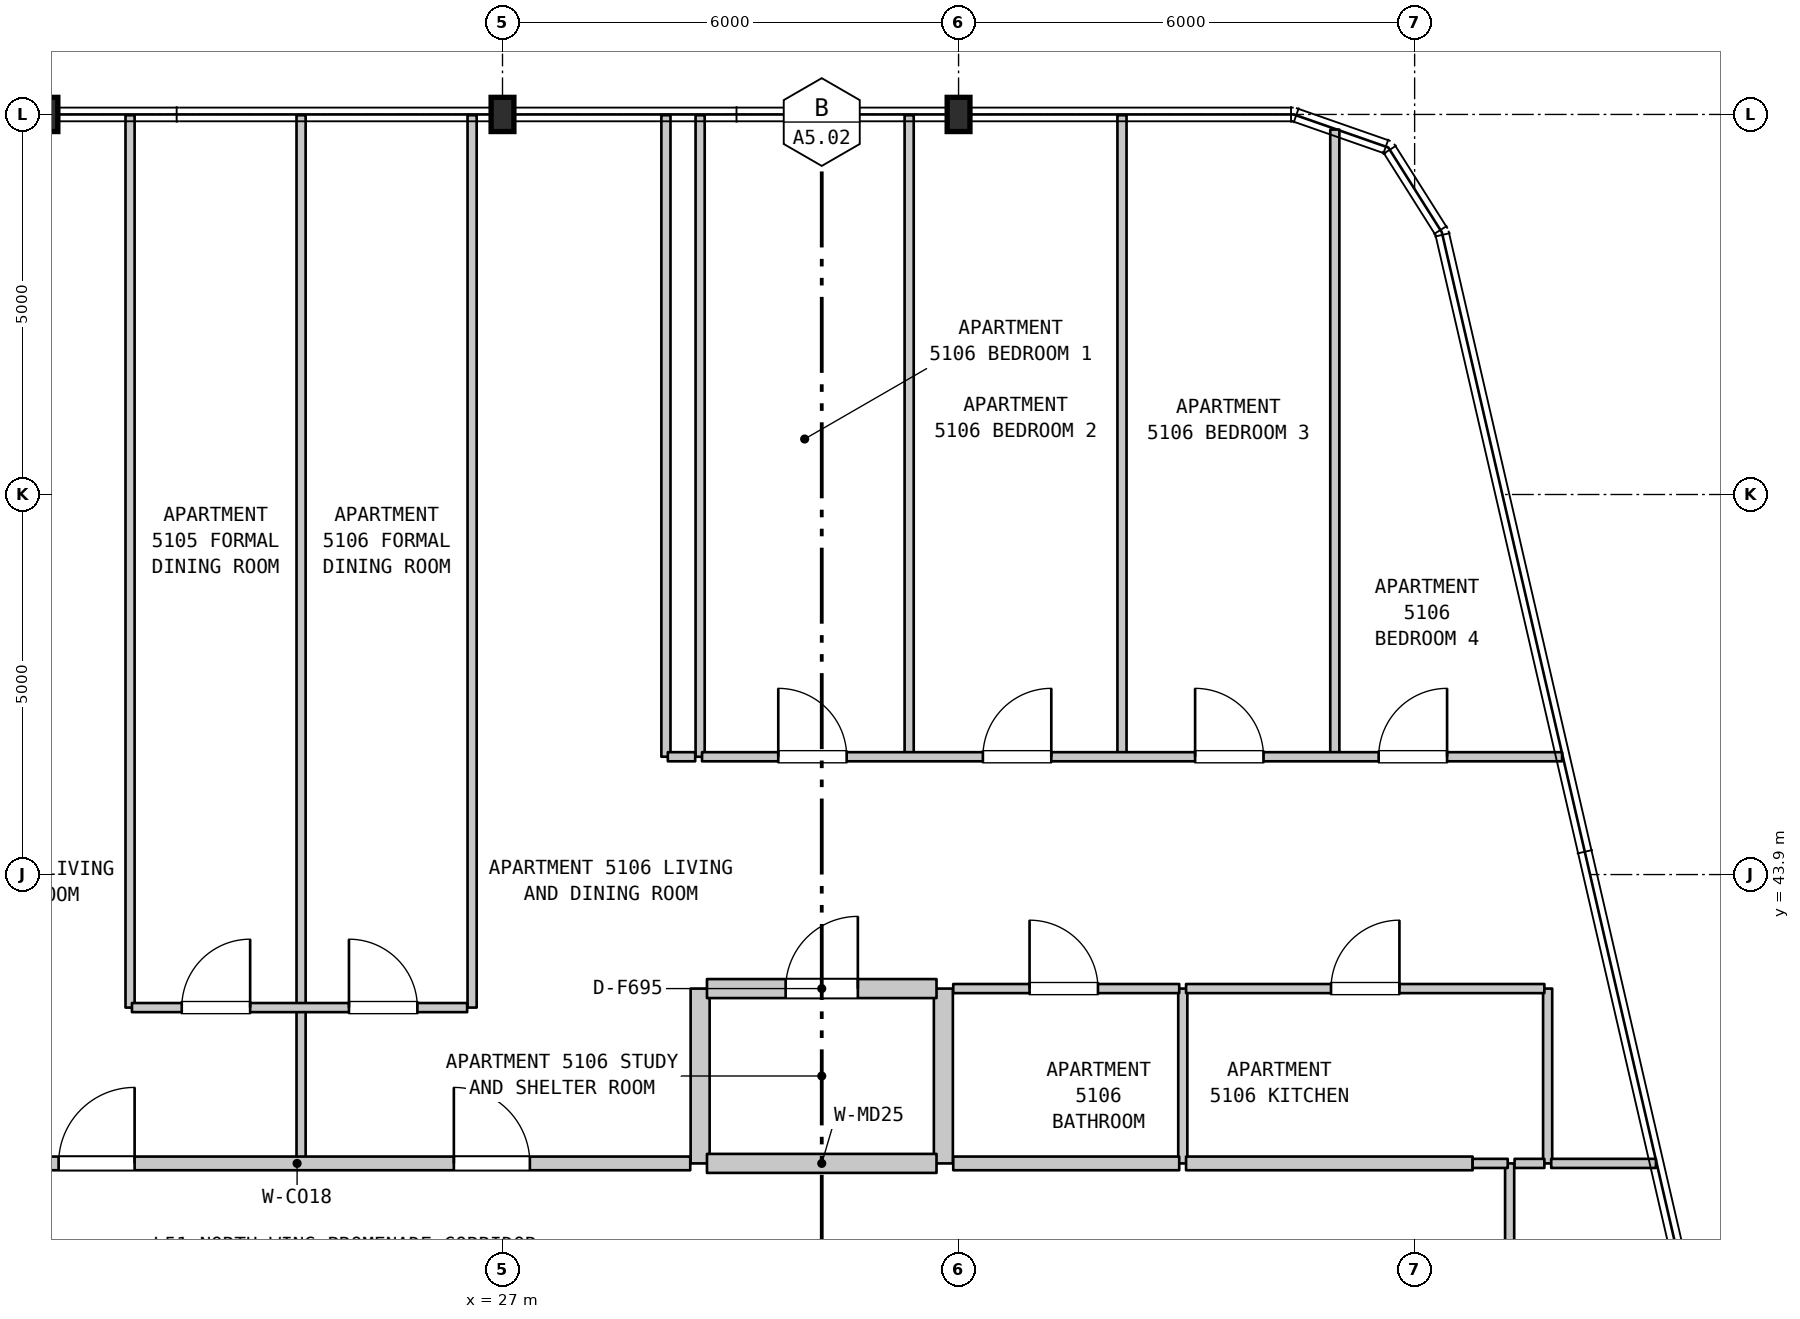
"""IFC4 building model, lengths in metres.
Left out: names, types, materials, properties, quantities, classifications, styles, units other than length and angle.
Written with IfcOpenShell. Run it as: python <this file> out.ifc"""

import sys

from ifc_helpers import new_model, si_unit, direction, frame, frame_2d, origin, origin_2d, place, context, subcontext, project, spatial, rectangle, i_section, extrude, element, fill, save


model = new_model("IFC4")
c1 = context("Model", 3, precision=1e-05, world=origin(), true_north=direction((0.0, 1.0)))
c2 = subcontext(c1, "Body", "Model", "MODEL_VIEW")
j1 = project(units=[si_unit("LENGTHUNIT", "METRE"), si_unit("PLANEANGLEUNIT", "RADIAN")], contexts=[c1])
p1 = place(None, origin())
s1 = spatial("IfcSite", under=j1, at=p1, CompositionType="ELEMENT")
p2 = place(p1, origin())
s2 = spatial("IfcBuilding", under=s1, at=p2, CompositionType="ELEMENT")
p3 = place(p2, frame((0.0, 0.0, 206.9)))
s3 = spatial("IfcBuildingStorey", under=s2, at=p3, CompositionType="ELEMENT", Elevation=206.9)
for number, where, z_axis, x_axis in (
    (1, (21.0, 53.9, 0.0), (0.0, 0.0, 1.0), (1.0, 0.0, 0.0)),
    (2, (27.0, 53.9, 0.0), (0.0, 0.0, 1.0), (1.0, 0.0, 0.0)),
    (3, (33.0, 53.9, 0.0), (0.0, 0.0, 1.0), (1.0, 0.0, 0.0)),
):
    element("IfcColumn", number, at=place(p3, frame(where, z_axis=z_axis, x_axis=x_axis)), inside=s3, PredefinedType="COLUMN", context=c2, shape_type="SweptSolid", body=[
        extrude(i_section(OverallWidth=0.3, OverallDepth=0.45, WebThickness=0.014, FlangeThickness=0.026, FilletRadius=0.027, at=origin_2d()), origin(), (0.0, 0.0, 1.0), 3.7),
    ])
p4 = place(p3, frame((22.1, 42.15, 0.0), z_axis=(0.0, 0.0, 1.0), x_axis=(0.0, 1.0, 0.0)))
e4 = element("IfcWall", 4, at=p4, inside=s3, PredefinedType="PARTITIONING", context=c2, shape_type="SweptSolid", body=[
    extrude(rectangle(XDim=11.74, YDim=0.12, at=frame_2d((5.87, 0.0))), origin(), (0.0, 0.0, 1.0), 3.39),
])
p5 = place(p3, frame((24.35, 40.1, 0.0), z_axis=(0.0, 0.0, 1.0), x_axis=(0.0, 1.0, 0.0)))
e5 = element("IfcWall", 5, at=p5, inside=s3, PredefinedType="PARTITIONING", context=c2, shape_type="SweptSolid", body=[
    extrude(rectangle(XDim=2.05, YDim=0.12, at=frame_2d((1.025, 0.0))), origin(), (0.0, 0.0, 1.0), 3.39),
])
for number, where, z_axis, x_axis in (
    (6, (24.35, 42.15, 0.0), (0.0, 0.0, 1.0), (0.0, 1.0, 0.0)),
    (7, (26.6, 42.15, 0.0), (0.0, 0.0, 1.0), (0.0, 1.0, 0.0)),
):
    element("IfcWall", number, at=place(p3, frame(where, z_axis=z_axis, x_axis=x_axis)), inside=s3, PredefinedType="PARTITIONING", context=c2, shape_type="SweptSolid", body=[
        extrude(rectangle(XDim=11.74, YDim=0.12, at=frame_2d((5.87, 0.0))), origin(), (0.0, 0.0, 1.0), 3.39),
    ])
p6 = place(p3, frame((29.15, 45.45, 0.0), z_axis=(0.0, 0.0, 1.0), x_axis=(0.0, 1.0, 0.0)))
e8 = element("IfcWall", 8, at=p6, inside=s3, PredefinedType="PARTITIONING", context=c2, shape_type="SweptSolid", body=[
    extrude(rectangle(XDim=8.44, YDim=0.12, at=frame_2d((4.22, 0.0))), origin(), (0.0, 0.0, 1.0), 3.39),
])
p7 = place(p3, frame((29.6, 40.1, 0.0), z_axis=(0.0, 0.0, 1.0), x_axis=(0.0, 1.0, 0.0)))
e9 = element("IfcWall", 9, at=p7, inside=s3, PredefinedType="STANDARD", context=c2, shape_type="SweptSolid", body=[
    extrude(rectangle(XDim=2.3, YDim=0.25, at=frame_2d((1.15, 0.0))), origin(), (0.0, 0.0, 1.0), 3.39),
])
for number, where, z_axis, x_axis in (
    (10, (29.6, 45.45, 0.0), (0.0, 0.0, 1.0), (0.0, 1.0, 0.0)),
    (11, (32.35, 45.45, 0.0), (0.0, 0.0, 1.0), (0.0, 1.0, 0.0)),
):
    element("IfcWall", number, at=place(p3, frame(where, z_axis=z_axis, x_axis=x_axis)), inside=s3, PredefinedType="PARTITIONING", context=c2, shape_type="SweptSolid", body=[
        extrude(rectangle(XDim=8.44, YDim=0.12, at=frame_2d((4.22, 0.0))), origin(), (0.0, 0.0, 1.0), 3.39),
    ])
p8 = place(p3, frame((32.8, 40.1, 0.0), z_axis=(0.0, 0.0, 1.0), x_axis=(0.0, 1.0, 0.0)))
e12 = element("IfcWall", 12, at=p8, inside=s3, PredefinedType="STANDARD", context=c2, shape_type="SweptSolid", body=[
    extrude(rectangle(XDim=2.3, YDim=0.25, at=frame_2d((1.15, 0.0))), origin(), (0.0, 0.0, 1.0), 3.39),
])
p9 = place(p3, frame((35.15, 45.45, 0.0), z_axis=(0.0, 0.0, 1.0), x_axis=(0.0, 1.0, 0.0)))
e13 = element("IfcWall", 13, at=p9, inside=s3, PredefinedType="PARTITIONING", context=c2, shape_type="SweptSolid", body=[
    extrude(rectangle(XDim=8.44, YDim=0.12, at=frame_2d((4.22, 0.0))), origin(), (0.0, 0.0, 1.0), 3.39),
])
p10 = place(p3, frame((35.95, 40.1, 0.0), z_axis=(0.0, 0.0, 1.0), x_axis=(0.0, 1.0, 0.0)))
e14 = element("IfcWall", 14, at=p10, inside=s3, PredefinedType="PARTITIONING", context=c2, shape_type="SweptSolid", body=[
    extrude(rectangle(XDim=2.3, YDim=0.12, at=frame_2d((1.15, 0.0))), origin(), (0.0, 0.0, 1.0), 3.39),
])
p11 = place(p3, frame((37.95, 45.45, 0.0), z_axis=(0.0, 0.0, 1.0), x_axis=(0.0, 1.0, 0.0)))
e15 = element("IfcWall", 15, at=p11, inside=s3, PredefinedType="PARTITIONING", context=c2, shape_type="SweptSolid", body=[
    extrude(rectangle(XDim=8.251, YDim=0.12, at=frame_2d((4.125, 0.0))), origin(), (0.0, 0.0, 1.0), 3.39),
])
p12 = place(p3, frame((40.25, 37.9, 0.0), z_axis=(0.0, 0.0, 1.0), x_axis=(0.0, 1.0, 0.0)))
e16 = element("IfcWall", 16, at=p12, inside=s3, PredefinedType="PARTITIONING", context=c2, shape_type="SweptSolid", body=[
    extrude(rectangle(XDim=2.2, YDim=0.12, at=frame_2d((1.1, 0.0))), origin(), (0.0, 0.0, 1.0), 3.39),
])
p13 = place(p3, frame((40.75, 40.1, 0.0), z_axis=(0.0, 0.0, 1.0), x_axis=(0.0, 1.0, 0.0)))
e17 = element("IfcWall", 17, at=p13, inside=s3, PredefinedType="PARTITIONING", context=c2, shape_type="SweptSolid", body=[
    extrude(rectangle(XDim=2.3, YDim=0.12, at=frame_2d((1.15, 0.0))), origin(), (0.0, 0.0, 1.0), 3.39),
])
p14 = place(p3, frame((19.125, 40.1, 0.0), z_axis=(0.0, 0.0, 1.0), x_axis=(1.0, 0.0, 0.0)))
e18 = element("IfcWall", 18, at=p14, inside=s3, PredefinedType="STANDARD", context=c2, shape_type="SweptSolid", body=[
    extrude(rectangle(XDim=10.345, YDim=0.18, at=frame_2d((5.172, 0.0))), origin(), (0.0, 0.0, 1.0), 3.39),
])
p15 = place(p14, frame((2.035, 0.0, 0.0)))
e19 = element("IfcOpeningElement", 19, at=p15, cuts=e18, PredefinedType="OPENING", context=c2, shape_type="SweptSolid", body=[
    extrude(rectangle(XDim=1.0, YDim=2.15, at=frame_2d((0.5, 1.075))), frame((0.0, 0.1, 0.0), z_axis=(0.0, -1.0, 0.0), x_axis=(1.0, 0.0, 0.0)), (0.0, 0.0, 1.0), 0.2),
])
p16 = place(p14, frame((7.235, 0.0, 0.0)))
e20 = element("IfcOpeningElement", 20, at=p16, cuts=e18, PredefinedType="OPENING", context=c2, shape_type="SweptSolid", body=[
    extrude(rectangle(XDim=1.0, YDim=2.15, at=frame_2d((0.5, 1.075))), frame((0.0, 0.1, 0.0), z_axis=(0.0, -1.0, 0.0), x_axis=(1.0, 0.0, 0.0)), (0.0, 0.0, 1.0), 0.2),
])
p17 = place(p3, frame((29.69, 40.1, 0.0), z_axis=(0.0, 0.0, 1.0), x_axis=(1.0, 0.0, 0.0)))
e21 = element("IfcWall", 21, at=p17, inside=s3, PredefinedType="STANDARD", context=c2, shape_type="SweptSolid", body=[
    extrude(rectangle(XDim=3.02, YDim=0.25, at=frame_2d((1.51, 0.0))), origin(), (0.0, 0.0, 1.0), 3.39),
])
p18 = place(p3, frame((32.93, 40.1, 0.0), z_axis=(0.0, 0.0, 1.0), x_axis=(1.0, 0.0, 0.0)))
e22 = element("IfcWall", 22, at=p18, inside=s3, PredefinedType="STANDARD", context=c2, shape_type="SweptSolid", body=[
    extrude(rectangle(XDim=2.973, YDim=0.18, at=frame_2d((1.487, 0.0))), origin(), (0.0, 0.0, 1.0), 3.39),
])
p19 = place(p3, frame((35.993, 40.1, 0.0), z_axis=(0.0, 0.0, 1.0), x_axis=(1.0, 0.0, 0.0)))
e23 = element("IfcWall", 23, at=p19, inside=s3, PredefinedType="STANDARD", context=c2, shape_type="SweptSolid", body=[
    extrude(rectangle(XDim=3.77, YDim=0.18, at=frame_2d((1.885, 0.0))), origin(), (0.0, 0.0, 1.0), 3.39),
])
p20 = place(p3, frame((39.763, 40.1, 0.0), z_axis=(0.0, 0.0, 1.0), x_axis=(1.0, 0.0, 0.0)))
e24 = element("IfcWall", 24, at=p20, inside=s3, PredefinedType="PARTITIONING", context=c2, shape_type="SweptSolid", body=[
    extrude(rectangle(XDim=0.462, YDim=0.12, at=frame_2d((0.231, 0.0))), origin(), (0.0, 0.0, 1.0), 3.39),
])
p21 = place(p3, frame((40.315, 40.1, 0.0), z_axis=(0.0, 0.0, 1.0), x_axis=(1.0, 0.0, 0.0)))
e25 = element("IfcWall", 25, at=p21, inside=s3, PredefinedType="PARTITIONING", context=c2, shape_type="SweptSolid", body=[
    extrude(rectangle(XDim=0.392, YDim=0.12, at=frame_2d((0.196, 0.0))), origin(), (0.0, 0.0, 1.0), 3.39),
])
p22 = place(p3, frame((40.797, 40.1, 0.0), z_axis=(0.0, 0.0, 1.0), x_axis=(1.0, 0.0, 0.0)))
e26 = element("IfcWall", 26, at=p22, inside=s3, PredefinedType="PARTITIONING", context=c2, shape_type="SweptSolid", body=[
    extrude(rectangle(XDim=1.378, YDim=0.12, at=frame_2d((0.689, 0.0))), origin(), (0.0, 0.0, 1.0), 3.39),
])
p23 = place(p3, frame((22.125, 42.15, 0.0), z_axis=(0.0, 0.0, 1.0), x_axis=(1.0, 0.0, 0.0)))
e27 = element("IfcWall", 27, at=p23, inside=s3, PredefinedType="PARTITIONING", context=c2, shape_type="SweptSolid", body=[
    extrude(rectangle(XDim=4.41, YDim=0.12, at=frame_2d((2.205, 0.0))), origin(), (0.0, 0.0, 1.0), 3.39),
])
p24 = place(p23, frame((0.655, 0.0, 0.0)))
e28 = element("IfcOpeningElement", 28, at=p24, cuts=e27, PredefinedType="OPENING", context=c2, shape_type="SweptSolid", body=[
    extrude(rectangle(XDim=0.9, YDim=2.15, at=frame_2d((0.45, 1.075))), frame((0.0, 0.07, 0.0), z_axis=(0.0, -1.0, 0.0), x_axis=(1.0, 0.0, 0.0)), (0.0, 0.0, 1.0), 0.14),
])
p25 = place(p23, frame((2.855, 0.0, 0.0)))
e29 = element("IfcOpeningElement", 29, at=p25, cuts=e27, PredefinedType="OPENING", context=c2, shape_type="SweptSolid", body=[
    extrude(rectangle(XDim=0.9, YDim=2.15, at=frame_2d((0.45, 1.075))), frame((0.0, 0.07, 0.0), z_axis=(0.0, -1.0, 0.0), x_axis=(1.0, 0.0, 0.0)), (0.0, 0.0, 1.0), 0.14),
])
p26 = place(p3, frame((29.69, 42.4, 0.0), z_axis=(0.0, 0.0, 1.0), x_axis=(1.0, 0.0, 0.0)))
e30 = element("IfcWall", 30, at=p26, inside=s3, PredefinedType="STANDARD", context=c2, shape_type="SweptSolid", body=[
    extrude(rectangle(XDim=3.02, YDim=0.25, at=frame_2d((1.51, 0.0))), origin(), (0.0, 0.0, 1.0), 3.39),
])
p27 = place(p26, frame((1.035, 0.0, 0.0)))
e31 = element("IfcOpeningElement", 31, at=p27, cuts=e30, PredefinedType="OPENING", context=c2, shape_type="SweptSolid", body=[
    extrude(rectangle(XDim=0.95, YDim=2.15, at=frame_2d((0.475, 1.075))), frame((0.0, 0.135, 0.0), z_axis=(0.0, -1.0, 0.0), x_axis=(1.0, 0.0, 0.0)), (0.0, 0.0, 1.0), 0.27),
])
p28 = place(p3, frame((32.93, 42.4, 0.0), z_axis=(0.0, 0.0, 1.0), x_axis=(1.0, 0.0, 0.0)))
e32 = element("IfcWall", 32, at=p28, inside=s3, PredefinedType="PARTITIONING", context=c2, shape_type="SweptSolid", body=[
    extrude(rectangle(XDim=2.973, YDim=0.12, at=frame_2d((1.487, 0.0))), origin(), (0.0, 0.0, 1.0), 3.39),
])
p29 = place(p28, frame((1.004, 0.0, 0.0)))
e33 = element("IfcOpeningElement", 33, at=p29, cuts=e32, PredefinedType="OPENING", context=c2, shape_type="SweptSolid", body=[
    extrude(rectangle(XDim=0.9, YDim=2.1, at=frame_2d((0.45, 1.05))), frame((0.0, 0.07, 0.0), z_axis=(0.0, -1.0, 0.0), x_axis=(1.0, 0.0, 0.0)), (0.0, 0.0, 1.0), 0.14),
])
p30 = place(p3, frame((35.993, 42.4, 0.0), z_axis=(0.0, 0.0, 1.0), x_axis=(1.0, 0.0, 0.0)))
e34 = element("IfcWall", 34, at=p30, inside=s3, PredefinedType="PARTITIONING", context=c2, shape_type="SweptSolid", body=[
    extrude(rectangle(XDim=4.714, YDim=0.12, at=frame_2d((2.357, 0.0))), origin(), (0.0, 0.0, 1.0), 3.39),
])
p31 = place(p30, frame((1.907, 0.0, 0.0)))
e35 = element("IfcOpeningElement", 35, at=p31, cuts=e34, PredefinedType="OPENING", context=c2, shape_type="SweptSolid", body=[
    extrude(rectangle(XDim=0.9, YDim=2.15, at=frame_2d((0.45, 1.075))), frame((0.0, 0.07, 0.0), z_axis=(0.0, -1.0, 0.0), x_axis=(1.0, 0.0, 0.0)), (0.0, 0.0, 1.0), 0.14),
])
p32 = place(p3, frame((29.175, 45.45, 0.0), z_axis=(0.0, 0.0, 1.0), x_axis=(1.0, 0.0, 0.0)))
e36 = element("IfcWall", 36, at=p32, inside=s3, PredefinedType="PARTITIONING", context=c2, shape_type="SweptSolid", body=[
    extrude(rectangle(XDim=0.36, YDim=0.12, at=frame_2d((0.18, 0.0))), origin(), (0.0, 0.0, 1.0), 3.39),
])
p33 = place(p3, frame((29.625, 45.45, 0.0), z_axis=(0.0, 0.0, 1.0), x_axis=(1.0, 0.0, 0.0)))
e37 = element("IfcWall", 37, at=p33, inside=s3, PredefinedType="PARTITIONING", context=c2, shape_type="SweptSolid", body=[
    extrude(rectangle(XDim=11.315, YDim=0.12, at=frame_2d((5.657, 0.0))), origin(), (0.0, 0.0, 1.0), 3.39),
])
p34 = place(p33, frame((1.003, 0.0, 0.0)))
e38 = element("IfcOpeningElement", 38, at=p34, cuts=e37, PredefinedType="OPENING", context=c2, shape_type="SweptSolid", body=[
    extrude(rectangle(XDim=0.9, YDim=2.15, at=frame_2d((0.45, 1.075))), frame((0.0, 0.07, 0.0), z_axis=(0.0, -1.0, 0.0), x_axis=(1.0, 0.0, 0.0)), (0.0, 0.0, 1.0), 0.14),
])
p35 = place(p33, frame((3.695, 0.0, 0.0)))
e39 = element("IfcOpeningElement", 39, at=p35, cuts=e37, PredefinedType="OPENING", context=c2, shape_type="SweptSolid", body=[
    extrude(rectangle(XDim=0.9, YDim=2.15, at=frame_2d((0.45, 1.075))), frame((0.0, 0.07, 0.0), z_axis=(0.0, -1.0, 0.0), x_axis=(1.0, 0.0, 0.0)), (0.0, 0.0, 1.0), 0.14),
])
p36 = place(p33, frame((6.487, 0.0, 0.0)))
e40 = element("IfcOpeningElement", 40, at=p36, cuts=e37, PredefinedType="OPENING", context=c2, shape_type="SweptSolid", body=[
    extrude(rectangle(XDim=0.9, YDim=2.15, at=frame_2d((0.45, 1.075))), frame((0.0, 0.07, 0.0), z_axis=(0.0, -1.0, 0.0), x_axis=(1.0, 0.0, 0.0)), (0.0, 0.0, 1.0), 0.14),
])
p37 = place(p33, frame((8.902, 0.0, 0.0)))
e41 = element("IfcOpeningElement", 41, at=p37, cuts=e37, PredefinedType="OPENING", context=c2, shape_type="SweptSolid", body=[
    extrude(rectangle(XDim=0.9, YDim=2.15, at=frame_2d((0.45, 1.075))), frame((0.0, 0.07, 0.0), z_axis=(0.0, -1.0, 0.0), x_axis=(1.0, 0.0, 0.0)), (0.0, 0.0, 1.0), 0.14),
])
p38 = place(p15, origin())
e42 = element("IfcDoor", 42, at=p38, inside=s3, OperationType="SINGLE_SWING_RIGHT", PredefinedType="DOOR", context=c2, shape_type="SweptSolid", body=[
    extrude(rectangle(XDim=1.0, YDim=2.15, at=frame_2d((0.5, 1.075))), frame((0.0, 0.025, 0.0), z_axis=(0.0, -1.0, 0.0), x_axis=(1.0, 0.0, 0.0)), (0.0, 0.0, 1.0), 0.05),
])
fill(e19, e42)
p39 = place(p16, origin())
e43 = element("IfcDoor", 43, at=p39, inside=s3, OperationType="SINGLE_SWING_LEFT", PredefinedType="DOOR", context=c2, shape_type="SweptSolid", body=[
    extrude(rectangle(XDim=1.0, YDim=2.15, at=frame_2d((0.5, 1.075))), frame((0.0, 0.025, 0.0), z_axis=(0.0, -1.0, 0.0), x_axis=(1.0, 0.0, 0.0)), (0.0, 0.0, 1.0), 0.05),
])
fill(e20, e43)
p40 = place(p24, origin())
e44 = element("IfcDoor", 44, at=p40, inside=s3, OperationType="SINGLE_SWING_RIGHT", PredefinedType="DOOR", context=c2, shape_type="SweptSolid", body=[
    extrude(rectangle(XDim=0.9, YDim=2.15, at=frame_2d((0.45, 1.075))), frame((0.0, 0.025, 0.0), z_axis=(0.0, -1.0, 0.0), x_axis=(1.0, 0.0, 0.0)), (0.0, 0.0, 1.0), 0.05),
])
fill(e28, e44)
p41 = place(p25, origin())
e45 = element("IfcDoor", 45, at=p41, inside=s3, OperationType="SINGLE_SWING_LEFT", PredefinedType="DOOR", context=c2, shape_type="SweptSolid", body=[
    extrude(rectangle(XDim=0.9, YDim=2.15, at=frame_2d((0.45, 1.075))), frame((0.0, 0.025, 0.0), z_axis=(0.0, -1.0, 0.0), x_axis=(1.0, 0.0, 0.0)), (0.0, 0.0, 1.0), 0.05),
])
fill(e29, e45)
p42 = place(p27, origin())
e46 = element("IfcDoor", 46, at=p42, inside=s3, OperationType="SINGLE_SWING_RIGHT", PredefinedType="DOOR", context=c2, shape_type="SweptSolid", body=[
    extrude(rectangle(XDim=0.95, YDim=2.15, at=frame_2d((0.475, 1.075))), frame((0.0, 0.025, 0.0), z_axis=(0.0, -1.0, 0.0), x_axis=(1.0, 0.0, 0.0)), (0.0, 0.0, 1.0), 0.05),
])
fill(e31, e46)
p43 = place(p29, origin())
e47 = element("IfcDoor", 47, at=p43, inside=s3, OperationType="SINGLE_SWING_LEFT", PredefinedType="DOOR", context=c2, shape_type="SweptSolid", body=[
    extrude(rectangle(XDim=0.9, YDim=2.1, at=frame_2d((0.45, 1.05))), frame((0.0, 0.025, 0.0), z_axis=(0.0, -1.0, 0.0), x_axis=(1.0, 0.0, 0.0)), (0.0, 0.0, 1.0), 0.05),
])
fill(e33, e47)
p44 = place(p31, origin())
e48 = element("IfcDoor", 48, at=p44, inside=s3, OperationType="SINGLE_SWING_RIGHT", PredefinedType="DOOR", context=c2, shape_type="SweptSolid", body=[
    extrude(rectangle(XDim=0.9, YDim=2.15, at=frame_2d((0.45, 1.075))), frame((0.0, 0.025, 0.0), z_axis=(0.0, -1.0, 0.0), x_axis=(1.0, 0.0, 0.0)), (0.0, 0.0, 1.0), 0.05),
])
fill(e35, e48)
p45 = place(p34, origin())
e49 = element("IfcDoor", 49, at=p45, inside=s3, OperationType="SINGLE_SWING_LEFT", PredefinedType="DOOR", context=c2, shape_type="SweptSolid", body=[
    extrude(rectangle(XDim=0.9, YDim=2.15, at=frame_2d((0.45, 1.075))), frame((0.0, 0.025, 0.0), z_axis=(0.0, -1.0, 0.0), x_axis=(1.0, 0.0, 0.0)), (0.0, 0.0, 1.0), 0.05),
])
fill(e38, e49)
p46 = place(p35, origin())
e50 = element("IfcDoor", 50, at=p46, inside=s3, OperationType="SINGLE_SWING_RIGHT", PredefinedType="DOOR", context=c2, shape_type="SweptSolid", body=[
    extrude(rectangle(XDim=0.9, YDim=2.15, at=frame_2d((0.45, 1.075))), frame((0.0, 0.025, 0.0), z_axis=(0.0, -1.0, 0.0), x_axis=(1.0, 0.0, 0.0)), (0.0, 0.0, 1.0), 0.05),
])
fill(e39, e50)
p47 = place(p36, origin())
e51 = element("IfcDoor", 51, at=p47, inside=s3, OperationType="SINGLE_SWING_LEFT", PredefinedType="DOOR", context=c2, shape_type="SweptSolid", body=[
    extrude(rectangle(XDim=0.9, YDim=2.15, at=frame_2d((0.45, 1.075))), frame((0.0, 0.025, 0.0), z_axis=(0.0, -1.0, 0.0), x_axis=(1.0, 0.0, 0.0)), (0.0, 0.0, 1.0), 0.05),
])
fill(e40, e51)
p48 = place(p37, origin())
e52 = element("IfcDoor", 52, at=p48, inside=s3, OperationType="SINGLE_SWING_RIGHT", PredefinedType="DOOR", context=c2, shape_type="SweptSolid", body=[
    extrude(rectangle(XDim=0.9, YDim=2.15, at=frame_2d((0.45, 1.075))), frame((0.0, 0.025, 0.0), z_axis=(0.0, -1.0, 0.0), x_axis=(1.0, 0.0, 0.0)), (0.0, 0.0, 1.0), 0.05),
])
fill(e41, e52)
save(model, sys.argv[1])
